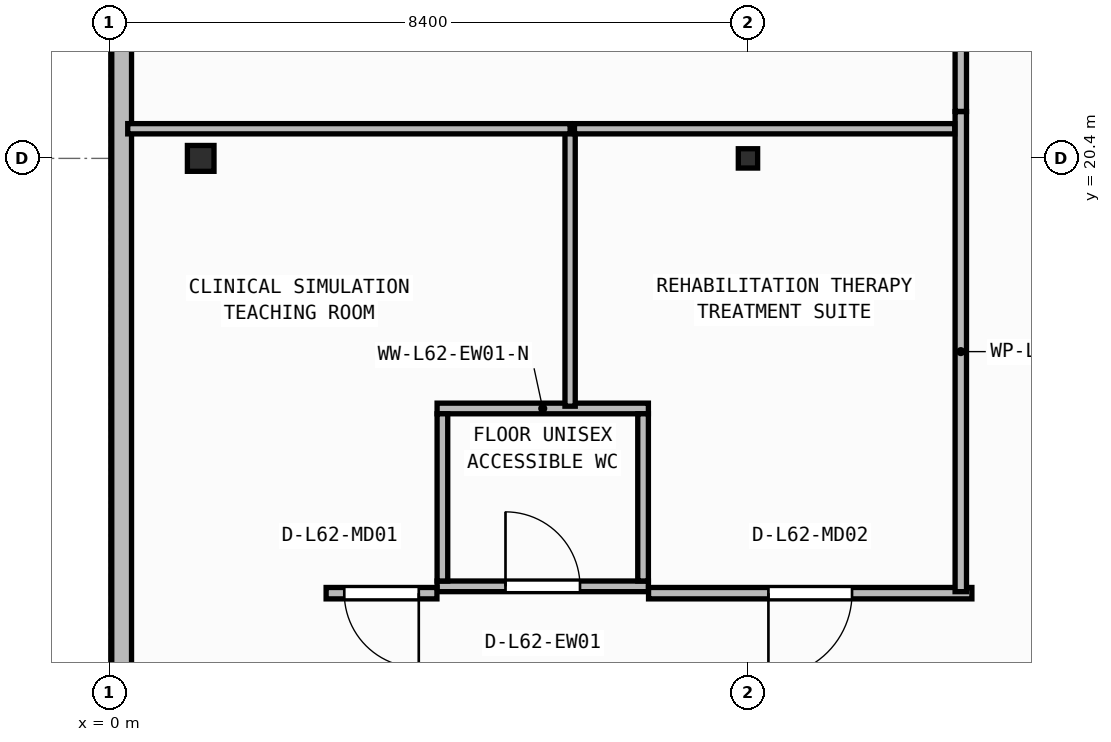
"""IFC4 building model, lengths in metres.
Left out: names, types, materials, properties, quantities, classifications, styles, units other than length and angle.
Written with IfcOpenShell. Run it as: python <this file> out.ifc"""

import sys

from ifc_helpers import new_model, si_unit, direction, frame, frame_2d, origin, origin_2d, place, context, subcontext, project, spatial, rectangle, i_section, extrude, element, fill, save


model = new_model("IFC4")
c1 = context("Model", 3, precision=1e-05, world=origin(), true_north=direction((0.0, 1.0)))
c2 = subcontext(c1, "Body", "Model", "MODEL_VIEW")
j1 = project(units=[si_unit("LENGTHUNIT", "METRE"), si_unit("PLANEANGLEUNIT", "RADIAN")], contexts=[c1])
p1 = place(None, origin())
s1 = spatial("IfcSite", under=j1, at=p1, CompositionType="ELEMENT")
p2 = place(p1, origin())
s2 = spatial("IfcBuilding", under=s1, at=p2, CompositionType="ELEMENT")
p3 = place(p2, frame((0.0, 0.0, 252.6)))
s3 = spatial("IfcBuildingStorey", under=s2, at=p3, CompositionType="ELEMENT", Elevation=252.6)
p4 = place(p3, frame((1.2, 20.4, 0.0), z_axis=(0.0, 0.0, 1.0), x_axis=(1.0, 0.0, 0.0)))
e1 = element("IfcColumn", 1, at=p4, inside=s3, PredefinedType="COLUMN", context=c2, shape_type="SweptSolid", body=[
    extrude(i_section(OverallWidth=0.35, OverallDepth=0.34, WebThickness=0.016, FlangeThickness=0.028, at=origin_2d()), origin(), (0.0, 0.0, 1.0), 3.95),
])
p5 = place(p3, frame((8.4, 20.4, 0.0), z_axis=(0.0, 0.0, 1.0), x_axis=(1.0, 0.0, 0.0)))
e2 = element("IfcColumn", 2, at=p5, inside=s3, PredefinedType="COLUMN", context=c2, shape_type="SweptSolid", body=[
    extrude(i_section(OverallWidth=0.254, OverallDepth=0.254, WebThickness=0.009, FlangeThickness=0.014, FilletRadius=0.013, at=origin_2d()), origin(), (0.0, 0.0, 1.0), 3.95),
])
p6 = place(p3, frame((0.16, 39.54, 0.0), z_axis=(0.0, 0.0, 1.0), x_axis=(0.0, -1.0, 0.0)))
e3 = element("IfcWall", 3, at=p6, inside=s3, PredefinedType="STANDARD", context=c2, shape_type="SweptSolid", body=[
    extrude(rectangle(XDim=36.88, YDim=0.26, at=frame_2d((18.44, 0.0))), origin(), (0.0, 0.0, 1.0), 3.71),
])
p7 = place(p6, frame((26.625, 0.0, 0.9)))
e4 = element("IfcOpeningElement", 4, at=p7, cuts=e3, PredefinedType="OPENING", context=c2, shape_type="SweptSolid", body=[
    extrude(rectangle(XDim=2.4, YDim=1.65, at=frame_2d((1.2, 0.825))), frame((0.0, 0.14, 0.0), z_axis=(0.0, -1.0, 0.0), x_axis=(1.0, 0.0, 0.0)), (0.0, 0.0, 1.0), 0.28),
])
p8 = place(p3, frame((4.31, 14.77, 0.0), z_axis=(0.0, 0.0, 1.0), x_axis=(1.0, 0.0, 0.0)))
e5 = element("IfcWall", 5, at=p8, inside=s3, PredefinedType="PARTITIONING", context=c2, shape_type="SweptSolid", body=[
    extrude(rectangle(XDim=2.78, YDim=0.14, at=frame_2d((1.39, 0.0))), origin(), (0.0, 0.0, 1.0), 3.71),
])
p9 = place(p8, frame((0.9, 0.0, 0.0)))
e6 = element("IfcOpeningElement", 6, at=p9, cuts=e5, PredefinedType="OPENING", context=c2, shape_type="SweptSolid", body=[
    extrude(rectangle(XDim=0.98, YDim=2.1, at=frame_2d((0.49, 1.05))), frame((0.0, 0.08, 0.0), z_axis=(0.0, -1.0, 0.0), x_axis=(1.0, 0.0, 0.0)), (0.0, 0.0, 1.0), 0.16),
])
p10 = place(p3, frame((4.31, 17.11, 0.0), z_axis=(0.0, 0.0, 1.0), x_axis=(1.0, 0.0, 0.0)))
e7 = element("IfcWall", 7, at=p10, inside=s3, PredefinedType="PARTITIONING", context=c2, shape_type="SweptSolid", body=[
    extrude(rectangle(XDim=2.78, YDim=0.14, at=frame_2d((1.39, 0.0))), origin(), (0.0, 0.0, 1.0), 3.71),
])
for number, where, z_axis, x_axis in (
    (8, (4.38, 14.84, 0.0), (0.0, 0.0, 1.0), (0.0, 1.0, 0.0)),
    (9, (7.02, 14.84, 0.0), (0.0, 0.0, 1.0), (0.0, 1.0, 0.0)),
):
    element("IfcWall", number, at=place(p3, frame(where, z_axis=z_axis, x_axis=x_axis)), inside=s3, PredefinedType="PARTITIONING", context=c2, shape_type="SweptSolid", body=[
        extrude(rectangle(XDim=2.2, YDim=0.14, at=frame_2d((1.1, 0.0))), origin(), (0.0, 0.0, 1.0), 3.71),
    ])
p11 = place(p3, frame((4.308, 14.68, 0.0), z_axis=(0.0, 0.0, 1.0), x_axis=(-1.0, 0.0, 0.0)))
e10 = element("IfcWall", 10, at=p11, inside=s3, PredefinedType="PARTITIONING", context=c2, shape_type="SweptSolid", body=[
    extrude(rectangle(XDim=1.458, YDim=0.15, at=frame_2d((0.729, 0.0))), origin(), (0.0, 0.0, 1.0), 3.71),
])
p12 = place(p11, frame((0.239, 0.0, 0.0)))
e11 = element("IfcOpeningElement", 11, at=p12, cuts=e10, PredefinedType="OPENING", context=c2, shape_type="SweptSolid", body=[
    extrude(rectangle(XDim=0.98, YDim=2.1, at=frame_2d((0.49, 1.05))), frame((0.0, 0.085, 0.0), z_axis=(0.0, -1.0, 0.0), x_axis=(1.0, 0.0, 0.0)), (0.0, 0.0, 1.0), 0.17),
])
p13 = place(p3, frame((11.346, 14.68, 0.0), z_axis=(0.0, 0.0, 1.0), x_axis=(-1.0, 0.0, 0.0)))
e12 = element("IfcWall", 12, at=p13, inside=s3, PredefinedType="PARTITIONING", context=c2, shape_type="SweptSolid", body=[
    extrude(rectangle(XDim=4.254, YDim=0.15, at=frame_2d((2.127, 0.0))), origin(), (0.0, 0.0, 1.0), 3.71),
])
p14 = place(p13, frame((1.577, 0.0, 0.0)))
e13 = element("IfcOpeningElement", 13, at=p14, cuts=e12, PredefinedType="OPENING", context=c2, shape_type="SweptSolid", body=[
    extrude(rectangle(XDim=1.1, YDim=2.1, at=frame_2d((0.55, 1.05))), frame((0.0, 0.085, 0.0), z_axis=(0.0, -1.0, 0.0), x_axis=(1.0, 0.0, 0.0)), (0.0, 0.0, 1.0), 0.17),
])
p15 = place(p3, frame((11.2, 21.016, 0.0), z_axis=(0.0, 0.0, 1.0), x_axis=(0.0, -1.0, 0.0)))
e14 = element("IfcWall", 14, at=p15, inside=s3, PredefinedType="PARTITIONING", context=c2, shape_type="SweptSolid", body=[
    extrude(rectangle(XDim=6.316, YDim=0.15, at=frame_2d((3.158, 0.0))), origin(), (0.0, 0.0, 1.0), 3.71),
])
p16 = place(p3, frame((11.2, 27.26, 0.0), z_axis=(0.0, 0.0, 1.0), x_axis=(0.0, -1.0, 0.0)))
e15 = element("IfcWall", 15, at=p16, inside=s3, PredefinedType="PARTITIONING", context=c2, shape_type="SweptSolid", body=[
    extrude(rectangle(XDim=6.242, YDim=0.15, at=frame_2d((3.121, 0.0))), origin(), (0.0, 0.0, 1.0), 3.71),
])
p17 = place(p16, frame((2.571, 0.0, 0.0)))
e16 = element("IfcOpeningElement", 16, at=p17, cuts=e15, PredefinedType="OPENING", context=c2, shape_type="SweptSolid", body=[
    extrude(rectangle(XDim=1.1, YDim=2.1, at=frame_2d((0.55, 1.05))), frame((0.0, 0.085, 0.0), z_axis=(0.0, -1.0, 0.0), x_axis=(1.0, 0.0, 0.0)), (0.0, 0.0, 1.0), 0.17),
])
p18 = place(p3, frame((6.06, 17.14, 0.0), z_axis=(0.0, 0.0, 1.0), x_axis=(0.0, 1.0, 0.0)))
e17 = element("IfcWall", 17, at=p18, inside=s3, PredefinedType="PARTITIONING", context=c2, shape_type="SweptSolid", body=[
    extrude(rectangle(XDim=3.65, YDim=0.135, at=frame_2d((1.825, 0.0))), origin(), (0.0, 0.0, 1.0), 3.71),
])
p19 = place(p3, frame((6.06, 20.79, 0.0), z_axis=(0.0, 0.0, 1.0), x_axis=(-1.0, 0.0, 0.0)))
e18 = element("IfcWall", 18, at=p19, inside=s3, PredefinedType="PARTITIONING", context=c2, shape_type="SweptSolid", body=[
    extrude(rectangle(XDim=5.82, YDim=0.135, at=frame_2d((2.91, 0.0))), origin(), (0.0, 0.0, 1.0), 3.157),
])
p20 = place(p3, frame((11.12, 20.79, 0.0), z_axis=(0.0, 0.0, 1.0), x_axis=(-1.0, 0.0, 0.0)))
e19 = element("IfcWall", 19, at=p20, inside=s3, PredefinedType="PARTITIONING", context=c2, shape_type="SweptSolid", body=[
    extrude(rectangle(XDim=5.003, YDim=0.135, at=frame_2d((2.501, 0.0))), origin(), (0.0, 0.0, 1.0), 3.157),
])
p21 = place(p9, origin())
e20 = element("IfcDoor", 20, at=p21, inside=s3, OperationType="SINGLE_SWING_LEFT", PredefinedType="DOOR", context=c2, shape_type="SweptSolid", body=[
    extrude(rectangle(XDim=0.98, YDim=2.1, at=frame_2d((0.49, 1.05))), frame((0.0, 0.025, 0.0), z_axis=(0.0, -1.0, 0.0), x_axis=(1.0, 0.0, 0.0)), (0.0, 0.0, 1.0), 0.05),
])
fill(e6, e20)
p22 = place(p12, origin())
e21 = element("IfcDoor", 21, at=p22, inside=s3, OperationType="SINGLE_SWING_LEFT", PredefinedType="DOOR", context=c2, shape_type="SweptSolid", body=[
    extrude(rectangle(XDim=0.98, YDim=2.1, at=frame_2d((0.49, 1.05))), frame((0.0, 0.025, 0.0), z_axis=(0.0, -1.0, 0.0), x_axis=(1.0, 0.0, 0.0)), (0.0, 0.0, 1.0), 0.05),
])
fill(e11, e21)
p23 = place(p14, origin())
e22 = element("IfcDoor", 22, at=p23, inside=s3, OperationType="SINGLE_SWING_RIGHT", PredefinedType="DOOR", context=c2, shape_type="SweptSolid", body=[
    extrude(rectangle(XDim=1.1, YDim=2.1, at=frame_2d((0.55, 1.05))), frame((0.0, 0.025, 0.0), z_axis=(0.0, -1.0, 0.0), x_axis=(1.0, 0.0, 0.0)), (0.0, 0.0, 1.0), 0.05),
])
fill(e13, e22)
save(model, sys.argv[1])
